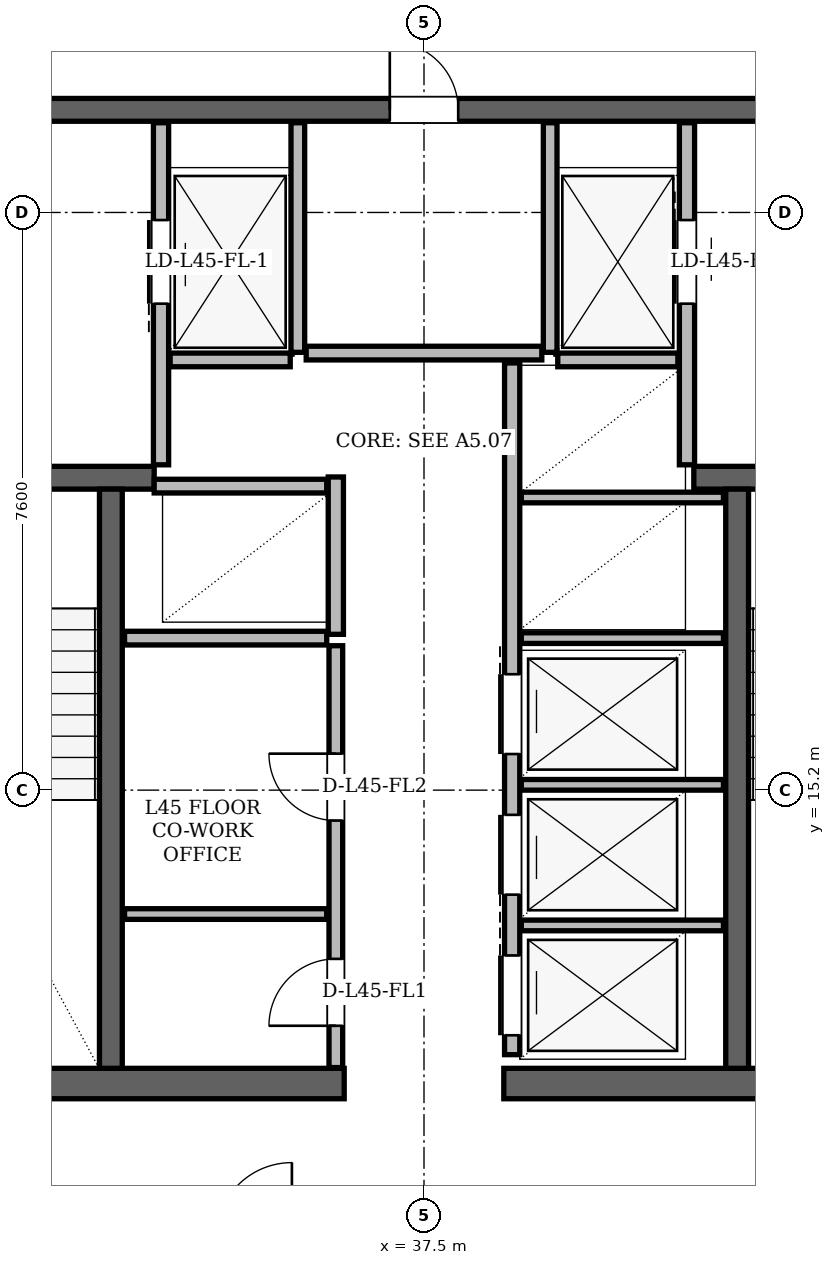
"""IFC4 building model, lengths in metres.
Left out: names, types, materials, properties, quantities, classifications, styles, units other than length and angle.
Written with IfcOpenShell. Run it as: python <this file> out.ifc"""

import sys

from ifc_helpers import new_model, si_unit, direction, frame, frame_2d, origin, place, context, subcontext, project, spatial, rectangle, extrude, element, fill, save


model = new_model("IFC4")
c1 = context("Model", 3, precision=1e-05, world=origin(), true_north=direction((0.0, 1.0)))
c2 = subcontext(c1, "Body", "Model", "MODEL_VIEW")
j1 = project(units=[si_unit("LENGTHUNIT", "METRE"), si_unit("PLANEANGLEUNIT", "RADIAN")], contexts=[c1])
p1 = place(None, origin())
s1 = spatial("IfcSite", under=j1, at=p1, CompositionType="ELEMENT")
p2 = place(p1, origin())
s2 = spatial("IfcBuilding", under=s1, at=p2, CompositionType="ELEMENT")
p3 = place(p2, frame((0.0, 0.0, 171.0)))
s3 = spatial("IfcBuildingStorey", under=s2, at=p3, CompositionType="ELEMENT", Elevation=171.0)
for number, where, z_axis, x_axis in (
    (1, (29.35, 11.34, 0.0), (0.0, 0.0, 1.0), (1.0, 0.0, 0.0)),
    (2, (38.55, 11.34, 0.0), (0.0, 0.0, 1.0), (1.0, 0.0, 0.0)),
):
    element("IfcWall", number, at=place(p3, frame(where, z_axis=z_axis, x_axis=x_axis)), inside=s3, PredefinedType="SHEAR", context=c2, shape_type="SweptSolid", body=[
        extrude(rectangle(XDim=7.1, YDim=0.4, at=frame_2d((3.55, 0.0))), origin(), (0.0, 0.0, 1.0), 3.38),
    ])
p4 = place(p3, frame((29.65, 24.15, 0.0), z_axis=(0.0, 0.0, 1.0), x_axis=(1.0, 0.0, 0.0)))
e3 = element("IfcWall", 3, at=p4, inside=s3, PredefinedType="SHEAR", context=c2, shape_type="SweptSolid", body=[
    extrude(rectangle(XDim=15.7, YDim=0.3, at=frame_2d((7.85, 0.0))), origin(), (0.0, 0.0, 1.0), 3.38),
])
p5 = place(p4, frame((1.7, 0.0, 0.0)))
e4 = element("IfcOpeningElement", 4, at=p5, cuts=e3, PredefinedType="OPENING", context=c2, shape_type="SweptSolid", body=[
    extrude(rectangle(XDim=1.2, YDim=2.2, at=frame_2d((0.6, 1.1))), frame((0.0, 0.15, 0.0), z_axis=(0.0, -1.0, 0.0), x_axis=(1.0, 0.0, 0.0)), (0.0, 0.0, 1.0), 0.3),
])
p6 = place(p4, frame((12.8, 0.0, 0.0)))
e5 = element("IfcOpeningElement", 5, at=p6, cuts=e3, PredefinedType="OPENING", context=c2, shape_type="SweptSolid", body=[
    extrude(rectangle(XDim=1.2, YDim=2.2, at=frame_2d((0.6, 1.1))), frame((0.0, 0.15, 0.0), z_axis=(0.0, -1.0, 0.0), x_axis=(1.0, 0.0, 0.0)), (0.0, 0.0, 1.0), 0.3),
])
p7 = place(p4, frame((7.4, 0.0, 0.0)))
e6 = element("IfcOpeningElement", 6, at=p7, cuts=e3, PredefinedType="OPENING", context=c2, shape_type="SweptSolid", body=[
    extrude(rectangle(XDim=0.9, YDim=2.05, at=frame_2d((0.45, 1.025))), frame((0.0, 0.15, 0.0), z_axis=(0.0, -1.0, 0.0), x_axis=(1.0, 0.0, 0.0)), (0.0, 0.0, 1.0), 0.3),
])
p8 = place(p3, frame((29.94, 19.31, 0.0), z_axis=(0.0, 0.0, 1.0), x_axis=(1.0, 0.0, 0.0)))
e7 = element("IfcWall", 7, at=p8, inside=s3, PredefinedType="SHEAR", context=c2, shape_type="SweptSolid", body=[
    extrude(rectangle(XDim=4.01, YDim=0.3, at=frame_2d((2.005, 0.0))), origin(), (0.0, 0.0, 1.0), 3.38),
])
p9 = place(p8, frame((1.01, 0.0, 0.0)))
e8 = element("IfcOpeningElement", 8, at=p9, cuts=e7, PredefinedType="OPENING", context=c2, shape_type="SweptSolid", body=[
    extrude(rectangle(XDim=1.4, YDim=2.2, at=frame_2d((0.7, 1.1))), frame((0.0, 0.15, 0.0), z_axis=(0.0, -1.0, 0.0), x_axis=(1.0, 0.0, 0.0)), (0.0, 0.0, 1.0), 0.3),
])
p10 = place(p3, frame((41.05, 19.31, 0.0), z_axis=(0.0, 0.0, 1.0), x_axis=(1.0, 0.0, 0.0)))
e9 = element("IfcWall", 9, at=p10, inside=s3, PredefinedType="SHEAR", context=c2, shape_type="SweptSolid", body=[
    extrude(rectangle(XDim=4.01, YDim=0.3, at=frame_2d((2.005, 0.0))), origin(), (0.0, 0.0, 1.0), 3.38),
])
p11 = place(p10, frame((1.6, 0.0, 0.0)))
e10 = element("IfcOpeningElement", 10, at=p11, cuts=e9, PredefinedType="OPENING", context=c2, shape_type="SweptSolid", body=[
    extrude(rectangle(XDim=1.4, YDim=2.2, at=frame_2d((0.7, 1.1))), frame((0.0, 0.15, 0.0), z_axis=(0.0, -1.0, 0.0), x_axis=(1.0, 0.0, 0.0)), (0.0, 0.0, 1.0), 0.3),
])
for number, where, z_axis, x_axis in (
    (11, (33.38, 11.54, 0.0), (0.0, 0.0, 1.0), (0.0, 1.0, 0.0)),
    (12, (41.62, 11.54, 0.0), (0.0, 0.0, 1.0), (0.0, 1.0, 0.0)),
):
    element("IfcWall", number, at=place(p3, frame(where, z_axis=z_axis, x_axis=x_axis)), inside=s3, PredefinedType="SHEAR", context=c2, shape_type="SweptSolid", body=[
        extrude(rectangle(XDim=7.62, YDim=0.3, at=frame_2d((3.81, 0.0))), origin(), (0.0, 0.0, 1.0), 3.38),
    ])
p12 = place(p3, frame((59.708, 12.214, 0.0), z_axis=(0.0, 0.0, 1.0), x_axis=(-0.499997229411, 0.866027003379, 0.0)))
e13 = element("IfcWall", 13, at=p12, inside=s3, PredefinedType="SOLIDWALL", context=c2, shape_type="SweptSolid", body=[
    extrude(rectangle(XDim=35.866, YDim=0.29, at=frame_2d((17.933, 0.0))), origin(), (0.0, 0.0, 1.0), 2.6),
])
p13 = place(p12, frame((8.034, 0.0, 0.0)))
e14 = element("IfcOpeningElement", 14, at=p13, cuts=e13, PredefinedType="OPENING", context=c2, shape_type="SweptSolid", body=[
    extrude(rectangle(XDim=1.5, YDim=2.2, at=frame_2d((0.75, 1.1))), frame((0.0, 0.145, 0.0), z_axis=(0.0, -1.0, 0.0), x_axis=(1.0, 0.0, 0.0)), (0.0, 0.0, 1.0), 0.29),
])
p14 = place(p12, frame((27.787, 0.0, 0.0)))
e15 = element("IfcOpeningElement", 15, at=p14, cuts=e13, PredefinedType="OPENING", context=c2, shape_type="SweptSolid", body=[
    extrude(rectangle(XDim=1.5, YDim=2.2, at=frame_2d((0.75, 1.1))), frame((0.0, 0.145, 0.0), z_axis=(0.0, -1.0, 0.0), x_axis=(1.0, 0.0, 0.0)), (0.0, 0.0, 1.0), 0.29),
])
p15 = place(p12, frame((33.023, 0.0, 0.85)))
e16 = element("IfcOpeningElement", 16, at=p15, cuts=e13, PredefinedType="OPENING", context=c2, shape_type="SweptSolid", body=[
    extrude(rectangle(XDim=1.2, YDim=1.48, at=frame_2d((0.6, 0.74))), frame((0.0, 0.145, 0.0), z_axis=(0.0, -1.0, 0.0), x_axis=(1.0, 0.0, 0.0)), (0.0, 0.0, 1.0), 0.29),
])
p16 = place(p12, frame((15.917, 0.0, 0.85)))
e17 = element("IfcOpeningElement", 17, at=p16, cuts=e13, PredefinedType="OPENING", context=c2, shape_type="SweptSolid", body=[
    extrude(rectangle(XDim=1.4, YDim=1.6, at=frame_2d((0.7, 0.8))), frame((0.0, 0.145, 0.0), z_axis=(0.0, -1.0, 0.0), x_axis=(1.0, 0.0, 0.0)), (0.0, 0.0, 1.0), 0.29),
])
p17 = place(p12, frame((21.416, 0.0, 0.85)))
e18 = element("IfcOpeningElement", 18, at=p17, cuts=e13, PredefinedType="OPENING", context=c2, shape_type="SweptSolid", body=[
    extrude(rectangle(XDim=2.5, YDim=1.64, at=frame_2d((1.25, 0.82))), frame((0.0, 0.145, 0.0), z_axis=(0.0, -1.0, 0.0), x_axis=(1.0, 0.0, 0.0)), (0.0, 0.0, 1.0), 0.29),
])
p18 = place(p3, frame((33.226, 43.275, 0.0), z_axis=(0.0, 0.0, 1.0), x_axis=(-0.499997229411, -0.866027003379, 0.0)))
e19 = element("IfcWall", 19, at=p18, inside=s3, PredefinedType="SOLIDWALL", context=c2, shape_type="SweptSolid", body=[
    extrude(rectangle(XDim=35.866, YDim=0.29, at=frame_2d((17.933, 0.0))), origin(), (0.0, 0.0, 1.0), 2.6),
])
p19 = place(p18, frame((8.034, 0.0, 0.0)))
e20 = element("IfcOpeningElement", 20, at=p19, cuts=e19, PredefinedType="OPENING", context=c2, shape_type="SweptSolid", body=[
    extrude(rectangle(XDim=1.5, YDim=2.2, at=frame_2d((0.75, 1.1))), frame((0.0, 0.145, 0.0), z_axis=(0.0, -1.0, 0.0), x_axis=(1.0, 0.0, 0.0)), (0.0, 0.0, 1.0), 0.29),
])
p20 = place(p18, frame((27.787, 0.0, 0.0)))
e21 = element("IfcOpeningElement", 21, at=p20, cuts=e19, PredefinedType="OPENING", context=c2, shape_type="SweptSolid", body=[
    extrude(rectangle(XDim=1.5, YDim=2.2, at=frame_2d((0.75, 1.1))), frame((0.0, 0.145, 0.0), z_axis=(0.0, -1.0, 0.0), x_axis=(1.0, 0.0, 0.0)), (0.0, 0.0, 1.0), 0.29),
])
p21 = place(p18, frame((33.63, 0.0, 0.85)))
e22 = element("IfcOpeningElement", 22, at=p21, cuts=e19, PredefinedType="OPENING", context=c2, shape_type="SweptSolid", body=[
    extrude(rectangle(XDim=1.2, YDim=1.48, at=frame_2d((0.6, 0.74))), frame((0.0, 0.145, 0.0), z_axis=(0.0, -1.0, 0.0), x_axis=(1.0, 0.0, 0.0)), (0.0, 0.0, 1.0), 0.29),
])
p22 = place(p18, frame((18.03, 0.0, 0.85)))
e23 = element("IfcOpeningElement", 23, at=p22, cuts=e19, PredefinedType="OPENING", context=c2, shape_type="SweptSolid", body=[
    extrude(rectangle(XDim=2.6, YDim=1.64, at=frame_2d((1.3, 0.82))), frame((0.0, 0.145, 0.0), z_axis=(0.0, -1.0, 0.0), x_axis=(1.0, 0.0, 0.0)), (0.0, 0.0, 1.0), 0.29),
])
p23 = place(p18, frame((26.121, 0.0, 0.85)))
e24 = element("IfcOpeningElement", 24, at=p23, cuts=e19, PredefinedType="OPENING", context=c2, shape_type="SweptSolid", body=[
    extrude(rectangle(XDim=1.2, YDim=1.48, at=frame_2d((0.6, 0.74))), frame((0.0, 0.145, 0.0), z_axis=(0.0, -1.0, 0.0), x_axis=(1.0, 0.0, 0.0)), (0.0, 0.0, 1.0), 0.29),
])
p24 = place(p18, frame((12.379, 0.0, 0.85)))
e25 = element("IfcOpeningElement", 25, at=p24, cuts=e19, PredefinedType="OPENING", context=c2, shape_type="SweptSolid", body=[
    extrude(rectangle(XDim=1.2, YDim=1.48, at=frame_2d((0.6, 0.74))), frame((0.0, 0.145, 0.0), z_axis=(0.0, -1.0, 0.0), x_axis=(1.0, 0.0, 0.0)), (0.0, 0.0, 1.0), 0.29),
])
p25 = place(p18, frame((14.675, 0.0, 0.85)))
e26 = element("IfcOpeningElement", 26, at=p25, cuts=e19, PredefinedType="OPENING", context=c2, shape_type="SweptSolid", body=[
    extrude(rectangle(XDim=1.8, YDim=1.64, at=frame_2d((0.9, 0.82))), frame((0.0, 0.145, 0.0), z_axis=(0.0, -1.0, 0.0), x_axis=(1.0, 0.0, 0.0)), (0.0, 0.0, 1.0), 0.29),
])
p26 = place(p18, frame((2.162, 0.0, 0.85)))
e27 = element("IfcOpeningElement", 27, at=p26, cuts=e19, PredefinedType="OPENING", context=c2, shape_type="SweptSolid", body=[
    extrude(rectangle(XDim=2.0, YDim=1.64, at=frame_2d((1.0, 0.82))), frame((0.0, 0.145, 0.0), z_axis=(0.0, -1.0, 0.0), x_axis=(1.0, 0.0, 0.0)), (0.0, 0.0, 1.0), 0.29),
])
p27 = place(p3, frame((34.04, 19.48, 0.0), z_axis=(0.0, 0.0, 1.0), x_axis=(0.0, 1.0, 0.0)))
e28 = element("IfcWall", 28, at=p27, inside=s3, PredefinedType="PARTITIONING", context=c2, shape_type="SweptSolid", body=[
    extrude(rectangle(XDim=4.5, YDim=0.2, at=frame_2d((2.25, 0.0))), origin(), (0.0, 0.0, 1.0), 3.38),
])
p28 = place(p27, frame((2.12, 0.0, 0.0)))
e29 = element("IfcOpeningElement", 29, at=p28, cuts=e28, PredefinedType="OPENING", context=c2, shape_type="SweptSolid", body=[
    extrude(rectangle(XDim=1.1, YDim=2.2, at=frame_2d((0.55, 1.1))), frame((0.0, 0.1, 0.0), z_axis=(0.0, -1.0, 0.0), x_axis=(1.0, 0.0, 0.0)), (0.0, 0.0, 1.0), 0.2),
])
p29 = place(p3, frame((35.84, 20.96, 0.0), z_axis=(0.0, 0.0, 1.0), x_axis=(0.0, 1.0, 0.0)))
e30 = element("IfcWall", 30, at=p29, inside=s3, PredefinedType="PARTITIONING", context=c2, shape_type="SweptSolid", body=[
    extrude(rectangle(XDim=3.02, YDim=0.18, at=frame_2d((1.51, 0.0))), origin(), (0.0, 0.0, 1.0), 3.38),
])
p30 = place(p3, frame((34.16, 20.86, 0.0), z_axis=(0.0, 0.0, 1.0), x_axis=(1.0, 0.0, 0.0)))
e31 = element("IfcWall", 31, at=p30, inside=s3, PredefinedType="PARTITIONING", context=c2, shape_type="SweptSolid", body=[
    extrude(rectangle(XDim=1.58, YDim=0.18, at=frame_2d((0.79, 0.0))), origin(), (0.0, 0.0, 1.0), 3.38),
])
p31 = place(p3, frame((40.96, 19.48, 0.0), z_axis=(0.0, 0.0, 1.0), x_axis=(0.0, 1.0, 0.0)))
e32 = element("IfcWall", 32, at=p31, inside=s3, PredefinedType="PARTITIONING", context=c2, shape_type="SweptSolid", body=[
    extrude(rectangle(XDim=4.5, YDim=0.2, at=frame_2d((2.25, 0.0))), origin(), (0.0, 0.0, 1.0), 3.38),
])
p32 = place(p31, frame((2.12, 0.0, 0.0)))
e33 = element("IfcOpeningElement", 33, at=p32, cuts=e32, PredefinedType="OPENING", context=c2, shape_type="SweptSolid", body=[
    extrude(rectangle(XDim=1.1, YDim=2.2, at=frame_2d((0.55, 1.1))), frame((0.0, 0.1, 0.0), z_axis=(0.0, -1.0, 0.0), x_axis=(1.0, 0.0, 0.0)), (0.0, 0.0, 1.0), 0.2),
])
p33 = place(p3, frame((39.16, 20.96, 0.0), z_axis=(0.0, 0.0, 1.0), x_axis=(0.0, 1.0, 0.0)))
e34 = element("IfcWall", 34, at=p33, inside=s3, PredefinedType="PARTITIONING", context=c2, shape_type="SweptSolid", body=[
    extrude(rectangle(XDim=3.02, YDim=0.18, at=frame_2d((1.51, 0.0))), origin(), (0.0, 0.0, 1.0), 3.38),
])
p34 = place(p3, frame((39.26, 20.86, 0.0), z_axis=(0.0, 0.0, 1.0), x_axis=(1.0, 0.0, 0.0)))
e35 = element("IfcWall", 35, at=p34, inside=s3, PredefinedType="PARTITIONING", context=c2, shape_type="SweptSolid", body=[
    extrude(rectangle(XDim=1.58, YDim=0.18, at=frame_2d((0.79, 0.0))), origin(), (0.0, 0.0, 1.0), 3.38),
])
p35 = place(p3, frame((36.34, 17.25, 0.0), z_axis=(0.0, 0.0, 1.0), x_axis=(0.0, 1.0, 0.0)))
e36 = element("IfcWall", 36, at=p35, inside=s3, PredefinedType="PARTITIONING", context=c2, shape_type="SweptSolid", body=[
    extrude(rectangle(XDim=2.07, YDim=0.2, at=frame_2d((1.035, 0.0))), origin(), (0.0, 0.0, 1.0), 3.38),
])
p36 = place(p3, frame((33.95, 19.2, 0.0), z_axis=(0.0, 0.0, 1.0), x_axis=(1.0, 0.0, 0.0)))
e37 = element("IfcWall", 37, at=p36, inside=s3, PredefinedType="PARTITIONING", context=c2, shape_type="SweptSolid", body=[
    extrude(rectangle(XDim=2.27, YDim=0.18, at=frame_2d((1.135, 0.0))), origin(), (0.0, 0.0, 1.0), 3.38),
])
p37 = place(p3, frame((33.56, 17.2, 0.0), z_axis=(0.0, 0.0, 1.0), x_axis=(1.0, 0.0, 0.0)))
e38 = element("IfcWall", 38, at=p37, inside=s3, PredefinedType="PARTITIONING", context=c2, shape_type="SweptSolid", body=[
    extrude(rectangle(XDim=2.66, YDim=0.18, at=frame_2d((1.33, 0.0))), origin(), (0.0, 0.0, 1.0), 3.38),
])
p38 = place(p3, frame((36.34, 11.55, 0.0), z_axis=(0.0, 0.0, 1.0), x_axis=(0.0, 1.0, 0.0)))
e39 = element("IfcWall", 39, at=p38, inside=s3, PredefinedType="PARTITIONING", context=c2, shape_type="SweptSolid", body=[
    extrude(rectangle(XDim=5.55, YDim=0.18, at=frame_2d((2.775, 0.0))), origin(), (0.0, 0.0, 1.0), 3.38),
])
p39 = place(p38, frame((0.55, 0.0, 0.0)))
e40 = element("IfcOpeningElement", 40, at=p39, cuts=e39, PredefinedType="OPENING", context=c2, shape_type="SweptSolid", body=[
    extrude(rectangle(XDim=0.88, YDim=2.08, at=frame_2d((0.44, 1.04))), frame((0.0, 0.09, 0.0), z_axis=(0.0, -1.0, 0.0), x_axis=(1.0, 0.0, 0.0)), (0.0, 0.0, 1.0), 0.18),
])
p40 = place(p38, frame((3.25, 0.0, 0.0)))
e41 = element("IfcOpeningElement", 41, at=p40, cuts=e39, PredefinedType="OPENING", context=c2, shape_type="SweptSolid", body=[
    extrude(rectangle(XDim=0.88, YDim=2.08, at=frame_2d((0.44, 1.04))), frame((0.0, 0.09, 0.0), z_axis=(0.0, -1.0, 0.0), x_axis=(1.0, 0.0, 0.0)), (0.0, 0.0, 1.0), 0.18),
])
p41 = place(p3, frame((33.56, 13.57, 0.0), z_axis=(0.0, 0.0, 1.0), x_axis=(1.0, 0.0, 0.0)))
e42 = element("IfcWall", 42, at=p41, inside=s3, PredefinedType="PARTITIONING", context=c2, shape_type="SweptSolid", body=[
    extrude(rectangle(XDim=2.66, YDim=0.14, at=frame_2d((1.33, 0.0))), origin(), (0.0, 0.0, 1.0), 3.38),
])
p42 = place(p3, frame((38.66, 11.72, 0.0), z_axis=(0.0, 0.0, 1.0), x_axis=(0.0, 1.0, 0.0)))
e43 = element("IfcWall", 43, at=p42, inside=s3, PredefinedType="PARTITIONING", context=c2, shape_type="SweptSolid", body=[
    extrude(rectangle(XDim=9.1, YDim=0.2, at=frame_2d((4.55, 0.0))), origin(), (0.0, 0.0, 1.0), 3.38),
])
p43 = place(p42, frame((0.255, 0.0, 0.0)))
e44 = element("IfcOpeningElement", 44, at=p43, cuts=e43, PredefinedType="OPENING", context=c2, shape_type="SweptSolid", body=[
    extrude(rectangle(XDim=1.05, YDim=2.15, at=frame_2d((0.525, 1.075))), frame((0.0, 0.1, 0.0), z_axis=(0.0, -1.0, 0.0), x_axis=(1.0, 0.0, 0.0)), (0.0, 0.0, 1.0), 0.2),
])
p44 = place(p42, frame((2.105, 0.0, 0.0)))
e45 = element("IfcOpeningElement", 45, at=p44, cuts=e43, PredefinedType="OPENING", context=c2, shape_type="SweptSolid", body=[
    extrude(rectangle(XDim=1.05, YDim=2.15, at=frame_2d((0.525, 1.075))), frame((0.0, 0.1, 0.0), z_axis=(0.0, -1.0, 0.0), x_axis=(1.0, 0.0, 0.0)), (0.0, 0.0, 1.0), 0.2),
])
p45 = place(p42, frame((3.955, 0.0, 0.0)))
e46 = element("IfcOpeningElement", 46, at=p45, cuts=e43, PredefinedType="OPENING", context=c2, shape_type="SweptSolid", body=[
    extrude(rectangle(XDim=1.05, YDim=2.15, at=frame_2d((0.525, 1.075))), frame((0.0, 0.1, 0.0), z_axis=(0.0, -1.0, 0.0), x_axis=(1.0, 0.0, 0.0)), (0.0, 0.0, 1.0), 0.2),
])
for number, where, z_axis, x_axis in (
    (47, (38.78, 13.42, 0.0), (0.0, 0.0, 1.0), (1.0, 0.0, 0.0)),
    (48, (38.78, 15.27, 0.0), (0.0, 0.0, 1.0), (1.0, 0.0, 0.0)),
    (49, (38.78, 17.2, 0.0), (0.0, 0.0, 1.0), (1.0, 0.0, 0.0)),
    (50, (38.78, 19.05, 0.0), (0.0, 0.0, 1.0), (1.0, 0.0, 0.0)),
):
    element("IfcWall", number, at=place(p3, frame(where, z_axis=z_axis, x_axis=x_axis)), inside=s3, PredefinedType="PARTITIONING", context=c2, shape_type="SweptSolid", body=[
        extrude(rectangle(XDim=2.66, YDim=0.14, at=frame_2d((1.33, 0.0))), origin(), (0.0, 0.0, 1.0), 3.38),
    ])
p46 = place(p3, frame((35.95, 20.95, 0.0), z_axis=(0.0, 0.0, 1.0), x_axis=(1.0, 0.0, 0.0)))
e51 = element("IfcWall", 51, at=p46, inside=s3, PredefinedType="PARTITIONING", context=c2, shape_type="SweptSolid", body=[
    extrude(rectangle(XDim=3.1, YDim=0.18, at=frame_2d((1.55, 0.0))), origin(), (0.0, 0.0, 1.0), 3.38),
])
p47 = place(p39, origin())
e52 = element("IfcDoor", 52, at=p47, inside=s3, OperationType="SINGLE_SWING_LEFT", PredefinedType="DOOR", context=c2, shape_type="SweptSolid", body=[
    extrude(rectangle(XDim=0.88, YDim=2.08, at=frame_2d((0.44, 1.04))), frame((0.0, 0.025, 0.0), z_axis=(0.0, -1.0, 0.0), x_axis=(1.0, 0.0, 0.0)), (0.0, 0.0, 1.0), 0.05),
])
fill(e40, e52)
p48 = place(p40, origin())
e53 = element("IfcDoor", 53, at=p48, inside=s3, OperationType="SINGLE_SWING_RIGHT", PredefinedType="DOOR", context=c2, shape_type="SweptSolid", body=[
    extrude(rectangle(XDim=0.88, YDim=2.08, at=frame_2d((0.44, 1.04))), frame((0.0, 0.025, 0.0), z_axis=(0.0, -1.0, 0.0), x_axis=(1.0, 0.0, 0.0)), (0.0, 0.0, 1.0), 0.05),
])
fill(e41, e53)
p49 = place(p28, origin())
e54 = element("IfcDoor", 54, at=p49, inside=s3, OperationType="SLIDING_TO_LEFT", PredefinedType="DOOR", context=c2, shape_type="SweptSolid", body=[
    extrude(rectangle(XDim=1.1, YDim=2.2, at=frame_2d((0.55, 1.1))), frame((0.0, 0.025, 0.0), z_axis=(0.0, -1.0, 0.0), x_axis=(1.0, 0.0, 0.0)), (0.0, 0.0, 1.0), 0.05),
])
fill(e29, e54)
p50 = place(p32, origin())
e55 = element("IfcDoor", 55, at=p50, inside=s3, OperationType="SLIDING_TO_RIGHT", PredefinedType="DOOR", context=c2, shape_type="SweptSolid", body=[
    extrude(rectangle(XDim=1.1, YDim=2.2, at=frame_2d((0.55, 1.1))), frame((0.0, 0.025, 0.0), z_axis=(0.0, -1.0, 0.0), x_axis=(1.0, 0.0, 0.0)), (0.0, 0.0, 1.0), 0.05),
])
fill(e33, e55)
p51 = place(p43, origin())
e56 = element("IfcDoor", 56, at=p51, inside=s3, OperationType="SLIDING_TO_RIGHT", PredefinedType="DOOR", context=c2, shape_type="SweptSolid", body=[
    extrude(rectangle(XDim=1.05, YDim=2.15, at=frame_2d((0.525, 1.075))), frame((0.0, 0.025, 0.0), z_axis=(0.0, -1.0, 0.0), x_axis=(1.0, 0.0, 0.0)), (0.0, 0.0, 1.0), 0.05),
])
fill(e44, e56)
p52 = place(p44, origin())
e57 = element("IfcDoor", 57, at=p52, inside=s3, OperationType="SLIDING_TO_LEFT", PredefinedType="DOOR", context=c2, shape_type="SweptSolid", body=[
    extrude(rectangle(XDim=1.05, YDim=2.15, at=frame_2d((0.525, 1.075))), frame((0.0, 0.025, 0.0), z_axis=(0.0, -1.0, 0.0), x_axis=(1.0, 0.0, 0.0)), (0.0, 0.0, 1.0), 0.05),
])
fill(e45, e57)
p53 = place(p45, origin())
e58 = element("IfcDoor", 58, at=p53, inside=s3, OperationType="SLIDING_TO_RIGHT", PredefinedType="DOOR", context=c2, shape_type="SweptSolid", body=[
    extrude(rectangle(XDim=1.05, YDim=2.15, at=frame_2d((0.525, 1.075))), frame((0.0, 0.025, 0.0), z_axis=(0.0, -1.0, 0.0), x_axis=(1.0, 0.0, 0.0)), (0.0, 0.0, 1.0), 0.05),
])
fill(e46, e58)
p54 = place(p7, origin())
e59 = element("IfcDoor", 59, at=p54, inside=s3, OperationType="SINGLE_SWING_LEFT", PredefinedType="DOOR", context=c2, shape_type="SweptSolid", body=[
    extrude(rectangle(XDim=0.9, YDim=2.05, at=frame_2d((0.45, 1.025))), frame((0.0, 0.025, 0.0), z_axis=(0.0, -1.0, 0.0), x_axis=(1.0, 0.0, 0.0)), (0.0, 0.0, 1.0), 0.05),
])
fill(e6, e59)
save(model, sys.argv[1])
